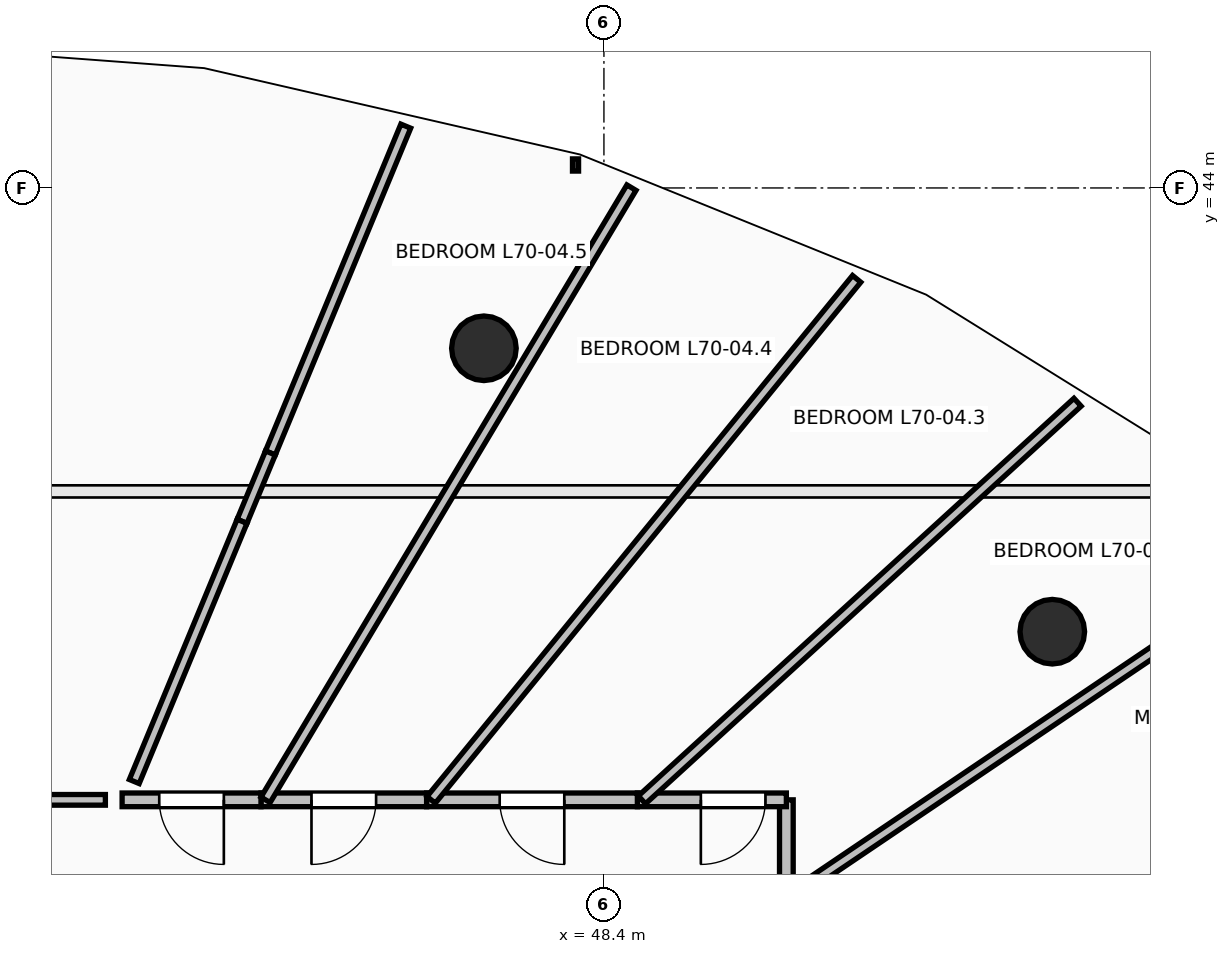
"""IFC4 building model, lengths in metres.
Left out: names, types, materials, properties, quantities, classifications, styles, units other than length and angle.
Written with IfcOpenShell. Run it as: python <this file> out.ifc"""

import sys

from ifc_helpers import new_model, si_unit, direction, frame, frame_2d, origin, origin_2d, place, context, subcontext, project, spatial, rectangle, circle, extrude, element, fill, save


model = new_model("IFC4")
c1 = context("Model", 3, precision=1e-05, world=origin(), true_north=direction((0.0, 1.0)))
c2 = subcontext(c1, "Body", "Model", "MODEL_VIEW")
j1 = project(units=[si_unit("LENGTHUNIT", "METRE"), si_unit("PLANEANGLEUNIT", "RADIAN")], contexts=[c1])
p1 = place(None, origin())
s1 = spatial("IfcSite", under=j1, at=p1, CompositionType="ELEMENT")
p2 = place(p1, origin())
s2 = spatial("IfcBuilding", under=s1, at=p2, CompositionType="ELEMENT")
p3 = place(p2, frame((0.0, 0.0, 259.1)))
s3 = spatial("IfcBuildingStorey", under=s2, at=p3, CompositionType="ELEMENT", Elevation=259.1)
for number, where, z_axis, x_axis in (
    (1, (54.299, 38.162, 0.0), (0.0, 0.0, 1.0), (0.707, 0.707, 0.0)),
    (2, (46.821, 41.891, 0.0), (0.0, 0.0, 1.0), (0.383, 0.924, 0.0)),
):
    element("IfcColumn", number, at=place(p3, frame(where, z_axis=z_axis, x_axis=x_axis)), inside=s3, PredefinedType="COLUMN", context=c2, shape_type="SweptSolid", body=[
        extrude(circle(Radius=0.425, at=origin_2d()), origin(), (0.0, 0.0, 1.0), 3.55),
    ])
p4 = place(p3, frame((50.8, 34.712, 0.0), z_axis=(0.0, 0.0, 1.0), x_axis=(0.0, 1.0, 0.0)))
e3 = element("IfcWall", 3, at=p4, inside=s3, PredefinedType="PARTITIONING", context=c2, shape_type="SweptSolid", body=[
    extrude(rectangle(XDim=1.238, YDim=0.18, at=frame_2d((0.619, 0.0))), origin(), (0.0, 0.0, 1.0), 2.482),
])
p5 = place(p3, frame((50.8, 35.95, 0.0), z_axis=(0.0, 0.0, 1.0), x_axis=(-1.0, 0.0, 0.0)))
e4 = element("IfcWall", 4, at=p5, inside=s3, PredefinedType="PARTITIONING", context=c2, shape_type="SweptSolid", body=[
    extrude(rectangle(XDim=1.96, YDim=0.18, at=frame_2d((0.98, 0.0))), origin(), (0.0, 0.0, 1.0), 2.936),
])
p6 = place(p5, frame((0.275, 0.0, 0.0)))
e5 = element("IfcOpeningElement", 5, at=p6, cuts=e4, PredefinedType="OPENING", context=c2, shape_type="SweptSolid", body=[
    extrude(rectangle(XDim=0.85, YDim=2.1, at=frame_2d((0.425, 1.05))), frame((0.0, 0.105, 0.0), z_axis=(0.0, -1.0, 0.0), x_axis=(1.0, 0.0, 0.0)), (0.0, 0.0, 1.0), 0.21),
])
p7 = place(p3, frame((48.84, 35.95, 0.0), z_axis=(0.0, 0.0, 1.0), x_axis=(-1.0, 0.0, 0.0)))
e6 = element("IfcWall", 6, at=p7, inside=s3, PredefinedType="PARTITIONING", context=c2, shape_type="SweptSolid", body=[
    extrude(rectangle(XDim=2.773, YDim=0.18, at=frame_2d((1.387, 0.0))), origin(), (0.0, 0.0, 1.0), 2.482),
])
p8 = place(p7, frame((0.961, 0.0, 0.0)))
e7 = element("IfcOpeningElement", 7, at=p8, cuts=e6, PredefinedType="OPENING", context=c2, shape_type="SweptSolid", body=[
    extrude(rectangle(XDim=0.85, YDim=2.1, at=frame_2d((0.425, 1.05))), frame((0.0, 0.105, 0.0), z_axis=(0.0, -1.0, 0.0), x_axis=(1.0, 0.0, 0.0)), (0.0, 0.0, 1.0), 0.21),
])
p9 = place(p3, frame((46.067, 35.95, 0.0), z_axis=(0.0, 0.0, 1.0), x_axis=(-1.0, 0.0, 0.0)))
e8 = element("IfcWall", 8, at=p9, inside=s3, PredefinedType="PARTITIONING", context=c2, shape_type="SweptSolid", body=[
    extrude(rectangle(XDim=2.179, YDim=0.18, at=frame_2d((1.089, 0.0))), origin(), (0.0, 0.0, 1.0), 3.29),
])
p10 = place(p9, frame((0.665, 0.0, 0.0)))
e9 = element("IfcOpeningElement", 9, at=p10, cuts=e8, PredefinedType="OPENING", context=c2, shape_type="SweptSolid", body=[
    extrude(rectangle(XDim=0.85, YDim=2.1, at=frame_2d((0.425, 1.05))), frame((0.0, 0.105, 0.0), z_axis=(0.0, -1.0, 0.0), x_axis=(1.0, 0.0, 0.0)), (0.0, 0.0, 1.0), 0.21),
])
p11 = place(p3, frame((43.888, 35.95, 0.0), z_axis=(0.0, 0.0, 1.0), x_axis=(-1.0, 0.0, 0.0)))
e10 = element("IfcWall", 10, at=p11, inside=s3, PredefinedType="PARTITIONING", context=c2, shape_type="SweptSolid", body=[
    extrude(rectangle(XDim=1.827, YDim=0.18, at=frame_2d((0.914, 0.0))), origin(), (0.0, 0.0, 1.0), 3.29),
])
p12 = place(p11, frame((0.489, 0.0, 0.0)))
e11 = element("IfcOpeningElement", 11, at=p12, cuts=e10, PredefinedType="OPENING", context=c2, shape_type="SweptSolid", body=[
    extrude(rectangle(XDim=0.85, YDim=2.1, at=frame_2d((0.425, 1.05))), frame((0.0, 0.105, 0.0), z_axis=(0.0, -1.0, 0.0), x_axis=(1.0, 0.0, 0.0)), (0.0, 0.0, 1.0), 0.21),
])
p13 = place(p3, frame((55.492, 34.399, 0.0), z_axis=(0.0, 0.0, 1.0), x_axis=(0.901372521065, 0.433044545363, 0.0)))
e12 = element("IfcWall", 12, at=p13, inside=s3, PredefinedType="PARTITIONING", context=c2, shape_type="SweptSolid", body=[
    extrude(rectangle(XDim=2.152, YDim=0.14, at=frame_2d((1.076, 0.0))), origin(), (0.0, 0.0, 1.0), 2.874),
])
p14 = place(p3, frame((57.466, 39.14, 0.0), z_axis=(0.0, 0.0, 1.0), x_axis=(-0.828823335801, -0.559510391352, 0.0)))
e13 = element("IfcWall", 13, at=p14, inside=s3, PredefinedType="PARTITIONING", context=c2, shape_type="SweptSolid", body=[
    extrude(rectangle(XDim=8.043, YDim=0.14, at=frame_2d((4.021, 0.0))), origin(), (0.0, 0.0, 1.0), 2.482),
])
p15 = place(p3, frame((54.631, 41.181, 0.0), z_axis=(0.0, 0.0, 1.0), x_axis=(-0.73860604902, -0.674137303783, 0.0)))
e14 = element("IfcWall", 14, at=p15, inside=s3, PredefinedType="PARTITIONING", context=c2, shape_type="SweptSolid", body=[
    extrude(rectangle(XDim=7.76, YDim=0.14, at=frame_2d((3.88, 0.0))), origin(), (0.0, 0.0, 1.0), 2.874),
])
p16 = place(p3, frame((51.725, 42.804, 0.0), z_axis=(0.0, 0.0, 1.0), x_axis=(-0.632582563989, -0.774492930721, 0.0)))
e15 = element("IfcWall", 15, at=p16, inside=s3, PredefinedType="PARTITIONING", context=c2, shape_type="SweptSolid", body=[
    extrude(rectangle(XDim=8.85, YDim=0.14, at=frame_2d((4.425, 0.0))), origin(), (0.0, 0.0, 1.0), 2.482),
])
p17 = place(p3, frame((48.762, 44.004, 0.0), z_axis=(0.0, 0.0, 1.0), x_axis=(-0.51305247577, -0.858357243289, 0.0)))
e16 = element("IfcWall", 16, at=p17, inside=s3, PredefinedType="PARTITIONING", context=c2, shape_type="SweptSolid", body=[
    extrude(rectangle(XDim=9.383, YDim=0.14, at=frame_2d((4.691, 0.0))), origin(), (0.0, 0.0, 1.0), 2.482),
])
p18 = place(p3, frame((41.841, 35.95, 0.0), z_axis=(0.0, 0.0, 1.0), x_axis=(-1.0, 0.0, 0.0)))
e17 = element("IfcWall", 17, at=p18, inside=s3, PredefinedType="PARTITIONING", context=c2, shape_type="SweptSolid", body=[
    extrude(rectangle(XDim=2.391, YDim=0.14, at=frame_2d((1.196, 0.0))), origin(), (0.0, 0.0, 1.0), 3.29),
])
p19 = place(p3, frame((45.793, 44.813, 0.0), z_axis=(0.0, 0.0, 1.0), x_axis=(-0.382733290986, -0.923858878818, 0.0)))
e18 = element("IfcWall", 18, at=p19, inside=s3, PredefinedType="PARTITIONING", context=c2, shape_type="SweptSolid", body=[
    extrude(rectangle(XDim=4.653, YDim=0.14, at=frame_2d((2.327, 0.0))), origin(), (0.0, 0.0, 1.0), 2.874),
])
p20 = place(p3, frame((44.012, 40.514, 0.0), z_axis=(0.0, 0.0, 1.0), x_axis=(-0.382941999237, -0.923772388211, 0.0)))
e19 = element("IfcWall", 19, at=p20, inside=s3, PredefinedType="PARTITIONING", context=c2, shape_type="SweptSolid", body=[
    extrude(rectangle(XDim=0.974, YDim=0.14, at=frame_2d((0.487, 0.0))), origin(), (0.0, 0.0, 1.0), 3.29),
])
p21 = place(p3, frame((43.639, 39.614, 0.0), z_axis=(0.0, 0.0, 1.0), x_axis=(-0.38270095978, -0.923872272224, 0.0)))
e20 = element("IfcWall", 20, at=p21, inside=s3, PredefinedType="PARTITIONING", context=c2, shape_type="SweptSolid", body=[
    extrude(rectangle(XDim=3.705, YDim=0.14, at=frame_2d((1.853, 0.0))), origin(), (0.0, 0.0, 1.0), 2.936),
])
p22 = place(p6, origin())
e21 = element("IfcDoor", 21, at=p22, inside=s3, OperationType="SINGLE_SWING_RIGHT", PredefinedType="DOOR", context=c2, shape_type="SweptSolid", body=[
    extrude(rectangle(XDim=0.85, YDim=2.1, at=frame_2d((0.425, 1.05))), frame((0.0, 0.025, 0.0), z_axis=(0.0, -1.0, 0.0), x_axis=(1.0, 0.0, 0.0)), (0.0, 0.0, 1.0), 0.05),
])
fill(e5, e21)
p23 = place(p8, origin())
e22 = element("IfcDoor", 22, at=p23, inside=s3, OperationType="SINGLE_SWING_LEFT", PredefinedType="DOOR", context=c2, shape_type="SweptSolid", body=[
    extrude(rectangle(XDim=0.85, YDim=2.1, at=frame_2d((0.425, 1.05))), frame((0.0, 0.025, 0.0), z_axis=(0.0, -1.0, 0.0), x_axis=(1.0, 0.0, 0.0)), (0.0, 0.0, 1.0), 0.05),
])
fill(e7, e22)
p24 = place(p10, origin())
e23 = element("IfcDoor", 23, at=p24, inside=s3, OperationType="SINGLE_SWING_RIGHT", PredefinedType="DOOR", context=c2, shape_type="SweptSolid", body=[
    extrude(rectangle(XDim=0.85, YDim=2.1, at=frame_2d((0.425, 1.05))), frame((0.0, 0.025, 0.0), z_axis=(0.0, -1.0, 0.0), x_axis=(1.0, 0.0, 0.0)), (0.0, 0.0, 1.0), 0.05),
])
fill(e9, e23)
p25 = place(p12, origin())
e24 = element("IfcDoor", 24, at=p25, inside=s3, OperationType="SINGLE_SWING_LEFT", PredefinedType="DOOR", context=c2, shape_type="SweptSolid", body=[
    extrude(rectangle(XDim=0.85, YDim=2.1, at=frame_2d((0.425, 1.05))), frame((0.0, 0.025, 0.0), z_axis=(0.0, -1.0, 0.0), x_axis=(1.0, 0.0, 0.0)), (0.0, 0.0, 1.0), 0.05),
])
fill(e11, e24)
save(model, sys.argv[1])
